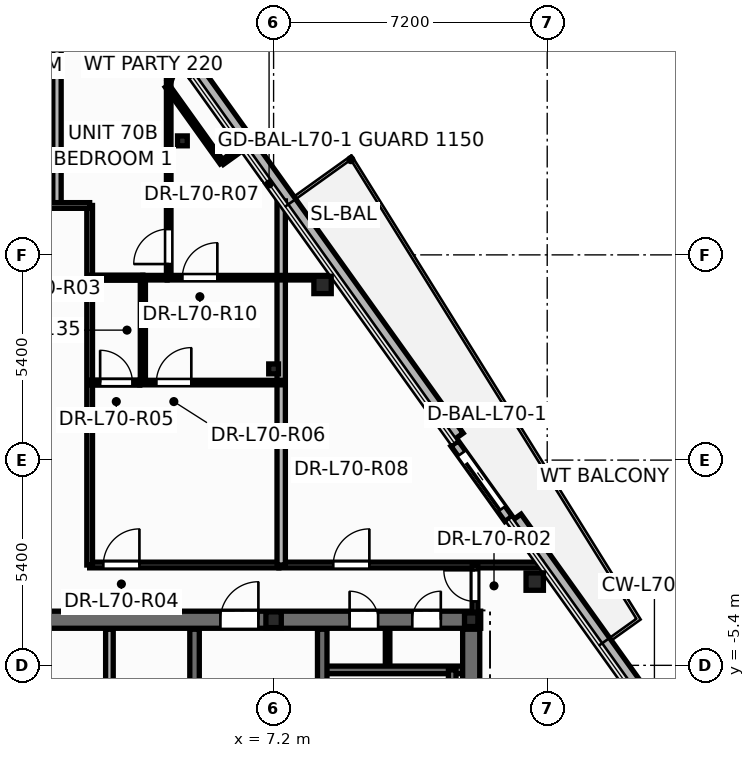
"""IFC4 building model, lengths in metres.
Left out: names, types, materials, properties, quantities, classifications, styles, units other than length and angle.
Written with IfcOpenShell. Run it as: python <this file> out.ifc"""

import sys

from ifc_helpers import new_model, si_unit, direction, frame, frame_2d, origin, origin_2d, place, context, subcontext, project, spatial, rectangle, hollow_circle, i_section, extrude, element, fill, save


model = new_model("IFC4")
c1 = context("Model", 3, precision=1e-05, world=origin(), true_north=direction((0.0, 1.0)))
c2 = subcontext(c1, "Body", "Model", "MODEL_VIEW")
j1 = project(units=[si_unit("LENGTHUNIT", "METRE"), si_unit("PLANEANGLEUNIT", "RADIAN")], contexts=[c1])
p1 = place(None, origin())
s1 = spatial("IfcSite", under=j1, at=p1, CompositionType="ELEMENT")
p2 = place(p1, origin())
s2 = spatial("IfcBuilding", under=s1, at=p2, CompositionType="ELEMENT")
p3 = place(p2, frame((0.0, 0.0, 267.0)))
s3 = spatial("IfcBuildingStorey", under=s2, at=p3, CompositionType="ELEMENT", Elevation=267.0)
for number, where, z_axis, x_axis in (
    (1, (14.072, -3.196, 0.0), (0.0, 0.0, 1.0), (1.0, 0.0, 0.0)),
    (2, (8.489, 4.61, 0.0), (0.0, 0.0, 1.0), (1.0, 0.0, 0.0)),
):
    element("IfcColumn", number, at=place(p3, frame(where, z_axis=z_axis, x_axis=x_axis)), inside=s3, PredefinedType="COLUMN", context=c2, shape_type="SweptSolid", body=[
        extrude(hollow_circle(Radius=0.229, WallThickness=0.016, at=origin_2d()), origin(), (0.0, 0.0, 1.0), 3.6),
    ])
p4 = place(p3, frame((12.4, -4.2, 0.0), z_axis=(0.0, 0.0, 1.0), x_axis=(1.0, 0.0, 0.0)))
e3 = element("IfcColumn", 3, at=p4, inside=s3, PredefinedType="COLUMN", context=c2, shape_type="SweptSolid", body=[
    extrude(i_section(OverallWidth=0.352, OverallDepth=0.359, WebThickness=0.018, FlangeThickness=0.026, at=origin_2d()), origin(), (0.0, 0.0, 1.0), 3.6),
])
p5 = place(p3, frame((7.2, -4.2, 0.0), z_axis=(0.0, 0.0, 1.0), x_axis=(1.0, 0.0, 0.0)))
e4 = element("IfcColumn", 4, at=p5, inside=s3, PredefinedType="PILASTER", context=c2, shape_type="SweptSolid", body=[
    extrude(i_section(OverallWidth=0.405, OverallDepth=0.414, WebThickness=0.022, FlangeThickness=0.032, at=origin_2d()), origin(), (0.0, 0.0, 1.0), 3.6),
])
for number, where, z_axis, x_axis in (
    (5, (7.2, 2.4, 0.0), (0.0, 0.0, 1.0), (1.0, 0.0, 0.0)),
    (6, (4.8, 8.4, 0.0), (0.0, 0.0, 1.0), (1.0, 0.0, 0.0)),
):
    element("IfcColumn", number, at=place(p3, frame(where, z_axis=z_axis, x_axis=x_axis)), inside=s3, PredefinedType="COLUMN", context=c2, shape_type="SweptSolid", body=[
        extrude(i_section(OverallWidth=0.256, OverallDepth=0.26, WebThickness=0.01, FlangeThickness=0.017, at=origin_2d()), origin(), (0.0, 0.0, 1.0), 3.6),
    ])
p6 = place(p3, frame((21.137, -12.113, -0.2), z_axis=(0.0, 0.0, 1.0), x_axis=(-0.58172961934, 0.813382228711, 0.0)))
e7 = element("IfcWall", 7, at=p6, inside=s3, PredefinedType="PARAPET", context=c2, shape_type="SweptSolid", body=[
    extrude(rectangle(XDim=13.015, YDim=0.36, at=frame_2d((6.507, 0.0))), origin(), (0.0, 0.0, 1.0), 0.38),
])
p7 = place(p3, frame((12.042, 0.604, -0.2), z_axis=(0.0, 0.0, 1.0), x_axis=(-0.581727587341, 0.813383681989, 0.0)))
e8 = element("IfcWall", 8, at=p7, inside=s3, PredefinedType="PARAPET", context=c2, shape_type="SweptSolid", body=[
    extrude(rectangle(XDim=16.607, YDim=0.36, at=frame_2d((8.304, 0.0))), origin(), (0.0, 0.0, 1.0), 0.38),
])
p8 = place(p3, frame((13.383, -1.547, -0.015), z_axis=(0.0, 0.0, 1.0), x_axis=(-0.58167352525, 0.813422344187, 0.0)))
e9 = element("IfcWall", 9, at=p8, inside=s3, PredefinedType="STANDARD", context=c2, shape_type="SweptSolid", body=[
    extrude(rectangle(XDim=2.44, YDim=0.24, at=frame_2d((1.22, 0.0))), origin(), (0.0, 0.0, 1.0), 2.878),
])
p9 = place(p8, frame((0.32, 0.0, 0.015)))
e10 = element("IfcOpeningElement", 10, at=p9, cuts=e9, PredefinedType="OPENING", context=c2, shape_type="SweptSolid", body=[
    extrude(rectangle(XDim=1.806, YDim=2.204, at=frame_2d((0.9, 1.102))), frame((0.0, 0.13, 0.0), z_axis=(0.0, -1.0, 0.0), x_axis=(1.0, 0.0, 0.0)), (0.0, 0.0, 1.0), 0.26),
])
p10 = place(p3, frame((10.2, -5.52, 0.0), z_axis=(0.0, 0.0, 1.0), x_axis=(0.0, 1.0, 0.0)))
e11 = element("IfcWall", 11, at=p10, inside=s3, PredefinedType="PARTITIONING", context=c2, shape_type="SweptSolid", body=[
    extrude(rectangle(XDim=1.12, YDim=0.12, at=frame_2d((0.56, 0.0))), origin(), (0.0, 0.0, 1.0), 3.345),
])
p11 = place(p3, frame((-12.65, -4.2, 0.0), z_axis=(0.0, 0.0, 1.0), x_axis=(1.0, 0.0, 0.0)))
e12 = element("IfcWall", 12, at=p11, inside=s3, PredefinedType="SHEAR", context=c2, shape_type="SweptSolid", body=[
    extrude(rectangle(XDim=25.3, YDim=0.45, at=frame_2d((12.65, 0.0))), origin(), (0.0, 0.0, 1.0), 3.6),
])
p12 = place(p11, frame((1.85, 0.0, 0.0)))
e13 = element("IfcOpeningElement", 13, at=p12, cuts=e12, PredefinedType="OPENING", context=c2, shape_type="SweptSolid", body=[
    extrude(rectangle(XDim=0.756, YDim=2.054, at=frame_2d((0.375, 1.027))), frame((0.0, 0.235, 0.0), z_axis=(0.0, -1.0, 0.0), x_axis=(1.0, 0.0, 0.0)), (0.0, 0.0, 1.0), 0.47),
])
p13 = place(p11, frame((21.85, 0.0, 0.0)))
e14 = element("IfcOpeningElement", 14, at=p13, cuts=e12, PredefinedType="OPENING", context=c2, shape_type="SweptSolid", body=[
    extrude(rectangle(XDim=0.756, YDim=2.054, at=frame_2d((0.375, 1.027))), frame((0.0, 0.235, 0.0), z_axis=(0.0, -1.0, 0.0), x_axis=(1.0, 0.0, 0.0)), (0.0, 0.0, 1.0), 0.47),
])
p14 = place(p11, frame((23.5, 0.0, 0.0)))
e15 = element("IfcOpeningElement", 15, at=p14, cuts=e12, PredefinedType="OPENING", context=c2, shape_type="SweptSolid", body=[
    extrude(rectangle(XDim=0.756, YDim=2.054, at=frame_2d((0.375, 1.027))), frame((0.0, 0.235, 0.0), z_axis=(0.0, -1.0, 0.0), x_axis=(1.0, 0.0, 0.0)), (0.0, 0.0, 1.0), 0.47),
])
p15 = place(p11, frame((5.85, 0.0, 0.0)))
e16 = element("IfcOpeningElement", 16, at=p15, cuts=e12, PredefinedType="OPENING", context=c2, shape_type="SweptSolid", body=[
    extrude(rectangle(XDim=1.006, YDim=2.104, at=frame_2d((0.5, 1.052))), frame((0.0, 0.235, 0.0), z_axis=(0.0, -1.0, 0.0), x_axis=(1.0, 0.0, 0.0)), (0.0, 0.0, 1.0), 0.47),
])
p16 = place(p11, frame((10.35, 0.0, 0.0)))
e17 = element("IfcOpeningElement", 17, at=p16, cuts=e12, PredefinedType="OPENING", context=c2, shape_type="SweptSolid", body=[
    extrude(rectangle(XDim=1.406, YDim=2.154, at=frame_2d((0.7, 1.077))), frame((0.0, 0.235, 0.0), z_axis=(0.0, -1.0, 0.0), x_axis=(1.0, 0.0, 0.0)), (0.0, 0.0, 1.0), 0.47),
])
p17 = place(p11, frame((18.45, 0.0, 0.0)))
e18 = element("IfcOpeningElement", 18, at=p17, cuts=e12, PredefinedType="OPENING", context=c2, shape_type="SweptSolid", body=[
    extrude(rectangle(XDim=1.006, YDim=2.104, at=frame_2d((0.5, 1.052))), frame((0.0, 0.235, 0.0), z_axis=(0.0, -1.0, 0.0), x_axis=(1.0, 0.0, 0.0)), (0.0, 0.0, 1.0), 0.47),
])
p18 = place(p3, frame((8.48, -5.52, 0.0), z_axis=(0.0, 0.0, 1.0), x_axis=(1.0, 0.0, 0.0)))
e19 = element("IfcWall", 19, at=p18, inside=s3, PredefinedType="SOLIDWALL", context=c2, shape_type="SweptSolid", body=[
    extrude(rectangle(XDim=3.87, YDim=0.2, at=frame_2d((1.935, 0.0))), origin(), (0.0, 0.0, 1.0), 3.6),
])
p19 = place(p3, frame((11.9, -13.1, 0.0), z_axis=(0.0, 0.0, 1.0), x_axis=(0.0, 1.0, 0.0)))
e20 = element("IfcWall", 20, at=p19, inside=s3, PredefinedType="SOLIDWALL", context=c2, shape_type="SweptSolid", body=[
    extrude(rectangle(XDim=7.58, YDim=0.2, at=frame_2d((3.79, 0.0))), origin(), (0.0, 0.0, 1.0), 3.6),
])
p20 = place(p3, frame((8.48, -13.85, 0.0), z_axis=(0.0, 0.0, 1.0), x_axis=(0.0, 1.0, 0.0)))
e21 = element("IfcWall", 21, at=p20, inside=s3, PredefinedType="SHEAR", context=c2, shape_type="SweptSolid", body=[
    extrude(rectangle(XDim=9.4, YDim=0.25, at=frame_2d((4.7, 0.0))), origin(), (0.0, 0.0, 1.0), 3.6),
])
p21 = place(p20, frame((6.95, 0.0, 0.0)))
e22 = element("IfcOpeningElement", 22, at=p21, cuts=e21, PredefinedType="OPENING", context=c2, shape_type="SweptSolid", body=[
    extrude(rectangle(XDim=1.006, YDim=2.104, at=frame_2d((0.5, 1.052))), frame((0.0, 0.135, 0.0), z_axis=(0.0, -1.0, 0.0), x_axis=(1.0, 0.0, 0.0)), (0.0, 0.0, 1.0), 0.27),
])
p22 = place(p3, frame((5.12, -13.85, 0.0), z_axis=(0.0, 0.0, 1.0), x_axis=(0.0, 1.0, 0.0)))
e23 = element("IfcWall", 23, at=p22, inside=s3, PredefinedType="SHEAR", context=c2, shape_type="SweptSolid", body=[
    extrude(rectangle(XDim=9.4, YDim=0.25, at=frame_2d((4.7, 0.0))), origin(), (0.0, 0.0, 1.0), 3.6),
])
p23 = place(p3, frame((12.4, -13.85, 0.0), z_axis=(0.0, 0.0, 1.0), x_axis=(0.0, 1.0, 0.0)))
e24 = element("IfcWall", 24, at=p23, inside=s3, PredefinedType="SHEAR", context=c2, shape_type="SweptSolid", body=[
    extrude(rectangle(XDim=9.4, YDim=0.45, at=frame_2d((4.7, 0.0))), origin(), (0.0, 0.0, 1.0), 3.6),
])
p24 = place(p3, frame((2.88, -9.45, 0.0), z_axis=(0.0, 0.0, 1.0), x_axis=(0.0, 1.0, 0.0)))
e25 = element("IfcWall", 25, at=p24, inside=s3, PredefinedType="SOLIDWALL", context=c2, shape_type="SweptSolid", body=[
    extrude(rectangle(XDim=5.0, YDim=0.2, at=frame_2d((2.5, 0.0))), origin(), (0.0, 0.0, 1.0), 3.345),
])
p25 = place(p24, frame((2.05, 0.0, 0.0)))
e26 = element("IfcOpeningElement", 26, at=p25, cuts=e25, PredefinedType="OPENING", context=c2, shape_type="SweptSolid", body=[
    extrude(rectangle(XDim=0.926, YDim=2.104, at=frame_2d((0.46, 1.052))), frame((0.0, 0.11, 0.0), z_axis=(0.0, -1.0, 0.0), x_axis=(1.0, 0.0, 0.0)), (0.0, 0.0, 1.0), 0.22),
])
p26 = place(p3, frame((1.5, 6.7, 0.0), z_axis=(0.0, 0.0, 1.0), x_axis=(0.0, 1.0, 0.0)))
e27 = element("IfcWall", 27, at=p26, inside=s3, PredefinedType="PARTITIONING", context=c2, shape_type="SweptSolid", body=[
    extrude(rectangle(XDim=7.417, YDim=0.22, at=frame_2d((3.708, 0.0))), origin(), (0.0, 0.0, 1.0), 2.718),
])
p27 = place(p3, frame((7.34, -2.76, 0.0), z_axis=(0.0, 0.0, 1.0), x_axis=(1.0, 0.0, 0.0)))
e28 = element("IfcWall", 28, at=p27, inside=s3, PredefinedType="PARTITIONING", context=c2, shape_type="SweptSolid", body=[
    extrude(rectangle(XDim=6.911, YDim=0.15, at=frame_2d((3.456, 0.0))), origin(), (0.0, 0.0, 1.0), 2.32),
])
p28 = place(p27, frame((1.43, 0.0, 0.0)))
e29 = element("IfcOpeningElement", 29, at=p28, cuts=e28, PredefinedType="OPENING", context=c2, shape_type="SweptSolid", body=[
    extrude(rectangle(XDim=0.956, YDim=2.104, at=frame_2d((0.475, 1.052))), frame((0.0, 0.085, 0.0), z_axis=(0.0, -1.0, 0.0), x_axis=(1.0, 0.0, 0.0)), (0.0, 0.0, 1.0), 0.17),
])
p29 = place(p3, frame((4.44, 4.8, 0.0), z_axis=(0.0, 0.0, 1.0), x_axis=(0.0, 1.0, 0.0)))
e30 = element("IfcWall", 30, at=p29, inside=s3, PredefinedType="PARTITIONING", context=c2, shape_type="SweptSolid", body=[
    extrude(rectangle(XDim=5.2, YDim=0.12, at=frame_2d((2.6, 0.0))), origin(), (0.0, 0.0, 1.0), 2.718),
])
p30 = place(p29, frame((0.359, 0.0, 0.0)))
e31 = element("IfcOpeningElement", 31, at=p30, cuts=e30, PredefinedType="OPENING", context=c2, shape_type="SweptSolid", body=[
    extrude(rectangle(XDim=0.926, YDim=2.104, at=frame_2d((0.46, 1.052))), frame((0.0, 0.07, 0.0), z_axis=(0.0, -1.0, 0.0), x_axis=(1.0, 0.0, 0.0)), (0.0, 0.0, 1.0), 0.14),
])
p31 = place(p3, frame((2.36, -2.76, 0.0), z_axis=(0.0, 0.0, 1.0), x_axis=(1.0, 0.0, 0.0)))
e32 = element("IfcWall", 32, at=p31, inside=s3, PredefinedType="PARTITIONING", context=c2, shape_type="SweptSolid", body=[
    extrude(rectangle(XDim=4.978, YDim=0.15, at=frame_2d((2.489, 0.0))), origin(), (0.0, 0.0, 1.0), 2.32),
])
p32 = place(p31, frame((0.359, 0.0, 0.0)))
e33 = element("IfcOpeningElement", 33, at=p32, cuts=e32, PredefinedType="OPENING", context=c2, shape_type="SweptSolid", body=[
    extrude(rectangle(XDim=0.956, YDim=2.104, at=frame_2d((0.475, 1.052))), frame((0.0, 0.085, 0.0), z_axis=(0.0, -1.0, 0.0), x_axis=(1.0, 0.0, 0.0)), (0.0, 0.0, 1.0), 0.17),
])
p33 = place(p3, frame((2.36, -2.76, 0.0), z_axis=(0.0, 0.0, 1.0), x_axis=(0.0, 1.0, 0.0)))
e34 = element("IfcWall", 34, at=p33, inside=s3, PredefinedType="PARTITIONING", context=c2, shape_type="SweptSolid", body=[
    extrude(rectangle(XDim=9.46, YDim=0.15, at=frame_2d((4.73, 0.0))), origin(), (0.0, 0.0, 1.0), 2.32),
])
p34 = place(p3, frame((7.4, -2.76, 0.0), z_axis=(0.0, 0.0, 1.0), x_axis=(0.0, 1.0, 0.0)))
e35 = element("IfcWall", 35, at=p34, inside=s3, PredefinedType="PARTITIONING", context=c2, shape_type="SweptSolid", body=[
    extrude(rectangle(XDim=9.579, YDim=0.22, at=frame_2d((4.79, 0.0))), origin(), (0.0, 0.0, 1.0), 2.32),
])
p35 = place(p3, frame((4.4, 4.8, 0.0), z_axis=(0.0, 0.0, 1.0), x_axis=(1.0, 0.0, 0.0)))
e36 = element("IfcWall", 36, at=p35, inside=s3, PredefinedType="PARTITIONING", context=c2, shape_type="SweptSolid", body=[
    extrude(rectangle(XDim=4.444, YDim=0.12, at=frame_2d((2.222, 0.0))), origin(), (0.0, 0.0, 1.0), 2.718),
])
p36 = place(p35, frame((0.4, 0.0, 0.0)))
e37 = element("IfcOpeningElement", 37, at=p36, cuts=e36, PredefinedType="OPENING", context=c2, shape_type="SweptSolid", body=[
    extrude(rectangle(XDim=0.926, YDim=2.104, at=frame_2d((0.46, 1.052))), frame((0.0, 0.07, 0.0), z_axis=(0.0, -1.0, 0.0), x_axis=(1.0, 0.0, 0.0)), (0.0, 0.0, 1.0), 0.14),
])
p37 = place(p3, frame((3.68, 2.04, 0.0), z_axis=(0.0, 0.0, 1.0), x_axis=(1.0, 0.0, 0.0)))
e38 = element("IfcWall", 38, at=p37, inside=s3, PredefinedType="PARTITIONING", context=c2, shape_type="SweptSolid", body=[
    extrude(rectangle(XDim=3.72, YDim=0.12, at=frame_2d((1.86, 0.0))), origin(), (0.0, 0.0, 1.0), 2.32),
])
p38 = place(p37, frame((0.435, 0.0, 0.0)))
e39 = element("IfcOpeningElement", 39, at=p38, cuts=e38, PredefinedType="OPENING", context=c2, shape_type="SweptSolid", body=[
    extrude(rectangle(XDim=0.926, YDim=2.104, at=frame_2d((0.46, 1.052))), frame((0.0, 0.07, 0.0), z_axis=(0.0, -1.0, 0.0), x_axis=(1.0, 0.0, 0.0)), (0.0, 0.0, 1.0), 0.14),
])
p39 = place(p3, frame((3.76, 2.04, 0.0), z_axis=(0.0, 0.0, 1.0), x_axis=(0.0, 1.0, 0.0)))
e40 = element("IfcWall", 40, at=p39, inside=s3, PredefinedType="PARTITIONING", context=c2, shape_type="SweptSolid", body=[
    extrude(rectangle(XDim=2.76, YDim=0.135, at=frame_2d((1.38, 0.0))), origin(), (0.0, 0.0, 1.0), 2.32),
])
p40 = place(p3, frame((5.842, 7.829, 0.0), z_axis=(0.0, 0.0, 1.0), x_axis=(-0.581685079242, 0.813414081872, 0.0)))
e41 = element("IfcWall", 41, at=p40, inside=s3, PredefinedType="PARTITIONING", context=c2, shape_type="SweptSolid", body=[
    extrude(rectangle(XDim=2.48, YDim=0.12, at=frame_2d((1.24, 0.0))), origin(), (0.0, 0.0, 1.0), 3.345),
])
p41 = place(p3, frame((12.5, -4.24, 0.0), z_axis=(0.0, 0.0, 1.0), x_axis=(0.0, 1.0, 0.0)))
e42 = element("IfcWall", 42, at=p41, inside=s3, PredefinedType="PARTITIONING", context=c2, shape_type="SweptSolid", body=[
    extrude(rectangle(XDim=1.48, YDim=0.15, at=frame_2d((0.74, 0.0))), origin(), (0.0, 0.0, 1.0), 2.32),
])
p42 = place(p41, frame((0.522, 0.0, 0.0)))
e43 = element("IfcOpeningElement", 43, at=p42, cuts=e42, PredefinedType="OPENING", context=c2, shape_type="SweptSolid", body=[
    extrude(rectangle(XDim=0.826, YDim=2.104, at=frame_2d((0.41, 1.052))), frame((0.0, 0.085, 0.0), z_axis=(0.0, -1.0, 0.0), x_axis=(1.0, 0.0, 0.0)), (0.0, 0.0, 1.0), 0.17),
])
p43 = place(p3, frame((2.36, 2.04, 0.0), z_axis=(0.0, 0.0, 1.0), x_axis=(1.0, 0.0, 0.0)))
e44 = element("IfcWall", 44, at=p43, inside=s3, PredefinedType="PARTITIONING", context=c2, shape_type="SweptSolid", body=[
    extrude(rectangle(XDim=1.318, YDim=0.135, at=frame_2d((0.659, 0.0))), origin(), (0.0, 0.0, 1.0), 2.964),
])
p44 = place(p43, frame((0.276, 0.0, 0.0)))
e45 = element("IfcOpeningElement", 45, at=p44, cuts=e44, PredefinedType="OPENING", context=c2, shape_type="SweptSolid", body=[
    extrude(rectangle(XDim=0.856, YDim=2.104, at=frame_2d((0.425, 1.052))), frame((0.0, 0.078, 0.0), z_axis=(0.0, -1.0, 0.0), x_axis=(1.0, 0.0, 0.0)), (0.0, 0.0, 1.0), 0.155),
])
p45 = place(p3, frame((2.36, 4.8, 0.0), z_axis=(0.0, 0.0, 1.0), x_axis=(1.0, 0.0, 0.0)))
e46 = element("IfcWall", 46, at=p45, inside=s3, PredefinedType="PARTITIONING", context=c2, shape_type="SweptSolid", body=[
    extrude(rectangle(XDim=1.4, YDim=0.135, at=frame_2d((0.7, 0.0))), origin(), (0.0, 0.0, 1.0), 2.964),
])
p46 = place(p3, frame((0.64, 6.7, 0.0), z_axis=(0.0, 0.0, 1.0), x_axis=(1.0, 0.0, 0.0)))
e47 = element("IfcWall", 47, at=p46, inside=s3, PredefinedType="PARTITIONING", context=c2, shape_type="SweptSolid", body=[
    extrude(rectangle(XDim=1.72, YDim=0.15, at=frame_2d((0.86, 0.0))), origin(), (0.0, 0.0, 1.0), 2.964),
])
p47 = place(p3, frame((4.455, 10.002, 0.0), z_axis=(0.0, 0.0, 1.0), x_axis=(0.338386229144, 0.941007311303, 0.0)))
e48 = element("IfcWall", 48, at=p47, inside=s3, PredefinedType="PARTITIONING", context=c2, shape_type="SweptSolid", body=[
    extrude(rectangle(XDim=0.649, YDim=0.12, at=frame_2d((0.324, 0.0))), origin(), (0.0, 0.0, 1.0), 2.863),
])
p48 = place(p3, frame((3.76, 4.8, 0.0), z_axis=(0.0, 0.0, 1.0), x_axis=(1.0, 0.0, 0.0)))
e49 = element("IfcWall", 49, at=p48, inside=s3, PredefinedType="PARTITIONING", context=c2, shape_type="SweptSolid", body=[
    extrude(rectangle(XDim=0.638, YDim=0.12, at=frame_2d((0.319, 0.0))), origin(), (0.0, 0.0, 1.0), 3.345),
])
p49 = place(p3, frame((6.387, 8.219, 0.0), z_axis=(0.0, 0.0, 1.0), x_axis=(-0.813265440227, -0.581892879947, 0.0)))
e50 = element("IfcWall", 50, at=p49, inside=s3, PredefinedType="PARTITIONING", context=c2, shape_type="SweptSolid", body=[
    extrude(rectangle(XDim=0.67, YDim=0.12, at=frame_2d((0.335, 0.0))), origin(), (0.0, 0.0, 1.0), 2.863),
])
p50 = place(p9, origin())
e51 = element("IfcDoor", 51, at=p50, inside=s3, OperationType="SLIDING_TO_LEFT", PredefinedType="DOOR", context=c2, shape_type="SweptSolid", body=[
    extrude(rectangle(XDim=1.8, YDim=2.2, at=frame_2d((0.9, 1.1))), frame((0.0, 0.025, 0.0), z_axis=(0.0, -1.0, 0.0), x_axis=(1.0, 0.0, 0.0)), (0.0, 0.0, 1.0), 0.05),
])
fill(e10, e51)
p51 = place(p13, origin())
e52 = element("IfcDoor", 52, at=p51, inside=s3, OperationType="SINGLE_SWING_LEFT", PredefinedType="DOOR", context=c2, shape_type="SweptSolid", body=[
    extrude(rectangle(XDim=0.75, YDim=2.05, at=frame_2d((0.375, 1.025))), frame((0.0, 0.025, 0.0), z_axis=(0.0, -1.0, 0.0), x_axis=(1.0, 0.0, 0.0)), (0.0, 0.0, 1.0), 0.05),
])
fill(e14, e52)
p52 = place(p14, origin())
e53 = element("IfcDoor", 53, at=p52, inside=s3, OperationType="SINGLE_SWING_RIGHT", PredefinedType="DOOR", context=c2, shape_type="SweptSolid", body=[
    extrude(rectangle(XDim=0.75, YDim=2.05, at=frame_2d((0.375, 1.025))), frame((0.0, 0.025, 0.0), z_axis=(0.0, -1.0, 0.0), x_axis=(1.0, 0.0, 0.0)), (0.0, 0.0, 1.0), 0.05),
])
fill(e15, e53)
p53 = place(p17, origin())
e54 = element("IfcDoor", 54, at=p53, inside=s3, OperationType="SINGLE_SWING_RIGHT", PredefinedType="DOOR", context=c2, shape_type="SweptSolid", body=[
    extrude(rectangle(XDim=1.0, YDim=2.1, at=frame_2d((0.5, 1.05))), frame((0.0, 0.025, 0.0), z_axis=(0.0, -1.0, 0.0), x_axis=(1.0, 0.0, 0.0)), (0.0, 0.0, 1.0), 0.05),
])
fill(e18, e54)
p54 = place(p42, origin())
e55 = element("IfcDoor", 55, at=p54, inside=s3, OperationType="SINGLE_SWING_RIGHT", PredefinedType="DOOR", context=c2, shape_type="SweptSolid", body=[
    extrude(rectangle(XDim=0.82, YDim=2.1, at=frame_2d((0.41, 1.05))), frame((0.0, 0.025, 0.0), z_axis=(0.0, -1.0, 0.0), x_axis=(1.0, 0.0, 0.0)), (0.0, 0.0, 1.0), 0.05),
])
fill(e43, e55)
p55 = place(p32, origin())
e56 = element("IfcDoor", 56, at=p55, inside=s3, OperationType="SINGLE_SWING_RIGHT", PredefinedType="DOOR", context=c2, shape_type="SweptSolid", body=[
    extrude(rectangle(XDim=0.95, YDim=2.1, at=frame_2d((0.475, 1.05))), frame((0.0, 0.025, 0.0), z_axis=(0.0, -1.0, 0.0), x_axis=(1.0, 0.0, 0.0)), (0.0, 0.0, 1.0), 0.05),
])
fill(e33, e56)
p56 = place(p44, origin())
e57 = element("IfcDoor", 57, at=p56, inside=s3, OperationType="SINGLE_SWING_LEFT", PredefinedType="DOOR", context=c2, shape_type="SweptSolid", body=[
    extrude(rectangle(XDim=0.85, YDim=2.1, at=frame_2d((0.425, 1.05))), frame((0.0, 0.025, 0.0), z_axis=(0.0, -1.0, 0.0), x_axis=(1.0, 0.0, 0.0)), (0.0, 0.0, 1.0), 0.05),
])
fill(e45, e57)
p57 = place(p38, origin())
e58 = element("IfcDoor", 58, at=p57, inside=s3, OperationType="SINGLE_SWING_RIGHT", PredefinedType="DOOR", context=c2, shape_type="SweptSolid", body=[
    extrude(rectangle(XDim=0.92, YDim=2.1, at=frame_2d((0.46, 1.05))), frame((0.0, 0.025, 0.0), z_axis=(0.0, -1.0, 0.0), x_axis=(1.0, 0.0, 0.0)), (0.0, 0.0, 1.0), 0.05),
])
fill(e39, e58)
p58 = place(p30, origin())
e59 = element("IfcDoor", 59, at=p58, inside=s3, OperationType="SINGLE_SWING_LEFT", PredefinedType="DOOR", context=c2, shape_type="SweptSolid", body=[
    extrude(rectangle(XDim=0.92, YDim=2.1, at=frame_2d((0.46, 1.05))), frame((0.0, 0.025, 0.0), z_axis=(0.0, -1.0, 0.0), x_axis=(1.0, 0.0, 0.0)), (0.0, 0.0, 1.0), 0.05),
])
fill(e31, e59)
p59 = place(p28, origin())
e60 = element("IfcDoor", 60, at=p59, inside=s3, OperationType="SINGLE_SWING_RIGHT", PredefinedType="DOOR", context=c2, shape_type="SweptSolid", body=[
    extrude(rectangle(XDim=0.95, YDim=2.1, at=frame_2d((0.475, 1.05))), frame((0.0, 0.025, 0.0), z_axis=(0.0, -1.0, 0.0), x_axis=(1.0, 0.0, 0.0)), (0.0, 0.0, 1.0), 0.05),
])
fill(e29, e60)
p60 = place(p36, origin())
e61 = element("IfcDoor", 61, at=p60, inside=s3, OperationType="SINGLE_SWING_RIGHT", PredefinedType="DOOR", context=c2, shape_type="SweptSolid", body=[
    extrude(rectangle(XDim=0.92, YDim=2.1, at=frame_2d((0.46, 1.05))), frame((0.0, 0.025, 0.0), z_axis=(0.0, -1.0, 0.0), x_axis=(1.0, 0.0, 0.0)), (0.0, 0.0, 1.0), 0.05),
])
fill(e37, e61)
save(model, sys.argv[1])
